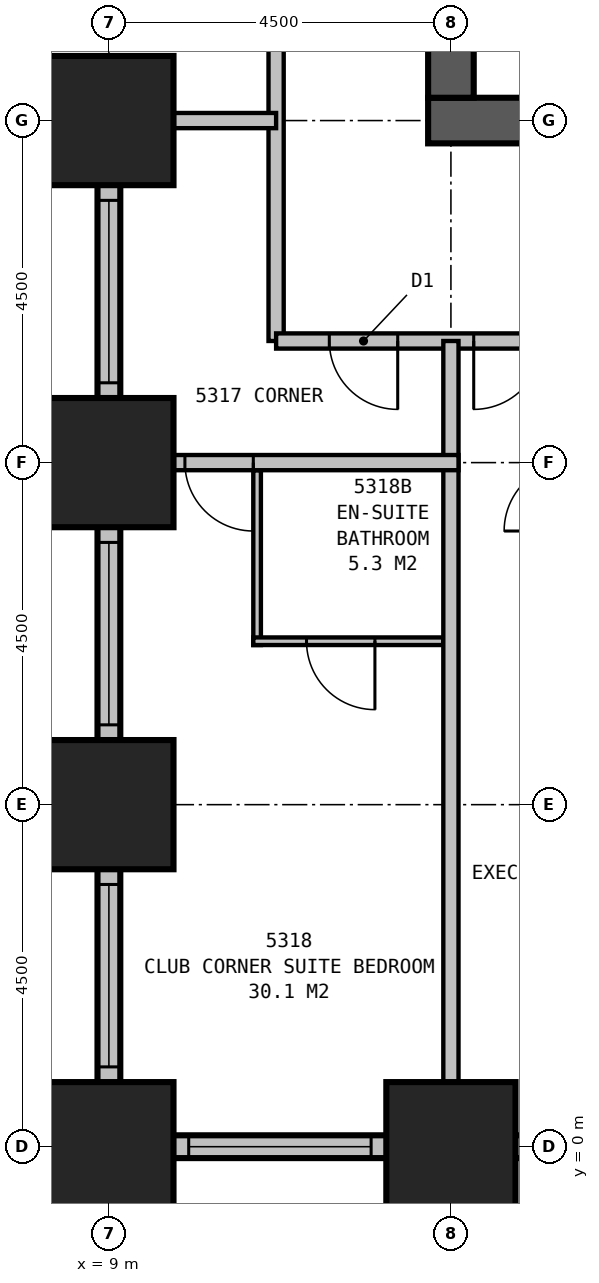
"""IFC4 building model, lengths in metres.
Left out: names, types, materials, properties, quantities, classifications, styles, units other than length and angle.
Written with IfcOpenShell. Run it as: python <this file> out.ifc"""

import sys

from ifc_helpers import new_model, si_unit, direction, frame, frame_2d, origin, origin_2d, place, context, subcontext, project, spatial, rectangle, extrude, element, fill, save


model = new_model("IFC4")
c1 = context("Model", 3, precision=1e-05, world=origin(), true_north=direction((0.0, 1.0)))
c2 = subcontext(c1, "Body", "Model", "MODEL_VIEW")
j1 = project(units=[si_unit("LENGTHUNIT", "METRE"), si_unit("PLANEANGLEUNIT", "RADIAN")], contexts=[c1])
p1 = place(None, origin())
s1 = spatial("IfcSite", under=j1, at=p1, CompositionType="ELEMENT")
p2 = place(p1, origin())
s2 = spatial("IfcBuilding", under=s1, at=p2, CompositionType="ELEMENT")
p3 = place(p2, frame((0.0, 0.0, 204.4)))
s3 = spatial("IfcBuildingStorey", under=s2, at=p3, CompositionType="ELEMENT", Elevation=204.4)
for number, where, z_axis, x_axis in (
    (1, (9.0, 13.5, 0.0), (0.0, 0.0, 1.0), (1.0, 0.0, 0.0)),
    (2, (9.0, 9.0, 0.0), (0.0, 0.0, 1.0), (1.0, 0.0, 0.0)),
    (3, (9.0, 4.5, 0.0), (0.0, 0.0, 1.0), (1.0, 0.0, 0.0)),
    (4, (9.0, 0.0, 0.0), (0.0, 0.0, 1.0), (1.0, 0.0, 0.0)),
    (5, (13.5, 0.0, 0.0), (0.0, 0.0, 1.0), (1.0, 0.0, 0.0)),
):
    element("IfcColumn", number, at=place(p3, frame(where, z_axis=z_axis, x_axis=x_axis)), inside=s3, PredefinedType="COLUMN", context=c2, shape_type="SweptSolid", body=[
        extrude(rectangle(XDim=1.7, YDim=1.7, at=origin_2d()), origin(), (0.0, 0.0, 1.0), 3.5),
    ])
p4 = place(p3, frame((13.2, 13.5, 0.0), z_axis=(0.0, 0.0, 1.0), x_axis=(1.0, 0.0, 0.0)))
e6 = element("IfcWall", 6, at=p4, inside=s3, PredefinedType="SHEAR", context=c2, shape_type="SweptSolid", body=[
    extrude(rectangle(XDim=23.1, YDim=0.6, at=frame_2d((11.55, 0.0))), origin(), (0.0, 0.0, 1.0), 3.5),
])
p5 = place(p3, frame((13.5, 16.5, 0.0), z_axis=(0.0, 0.0, 1.0), x_axis=(0.0, -1.0, 0.0)))
e7 = element("IfcWall", 7, at=p5, inside=s3, PredefinedType="SHEAR", context=c2, shape_type="SweptSolid", body=[
    extrude(rectangle(XDim=2.7, YDim=0.6, at=frame_2d((1.35, 0.0))), origin(), (0.0, 0.0, 1.0), 3.5),
])
p6 = place(p3, frame((1.35, 13.5, 0.0), z_axis=(0.0, 0.0, 1.0), x_axis=(1.0, 0.0, 0.0)))
e8 = element("IfcWall", 8, at=p6, inside=s3, PredefinedType="STANDARD", context=c2, shape_type="SweptSolid", body=[
    extrude(rectangle(XDim=7.8, YDim=0.3, at=frame_2d((3.9, 0.0))), origin(), (0.0, 0.0, 1.0), 2.25),
])
p7 = place(p6, frame((1.2, 0.0, 0.5)))
e9 = element("IfcOpeningElement", 9, at=p7, cuts=e8, PredefinedType="OPENING", context=c2, shape_type="SweptSolid", body=[
    extrude(rectangle(XDim=0.9, YDim=1.6, at=frame_2d((0.45, 0.8))), frame((0.0, 0.16, 0.0), z_axis=(0.0, -1.0, 0.0), x_axis=(1.0, 0.0, 0.0)), (0.0, 0.0, 1.0), 0.32),
])
p8 = place(p6, frame((4.2, 0.0, 0.5)))
e10 = element("IfcOpeningElement", 10, at=p8, cuts=e8, PredefinedType="OPENING", context=c2, shape_type="SweptSolid", body=[
    extrude(rectangle(XDim=2.4, YDim=1.6, at=frame_2d((1.2, 0.8))), frame((0.0, 0.16, 0.0), z_axis=(0.0, -1.0, 0.0), x_axis=(1.0, 0.0, 0.0)), (0.0, 0.0, 1.0), 0.32),
])
p9 = place(p3, frame((9.0, 13.65, 0.0), z_axis=(0.0, 0.0, 1.0), x_axis=(0.0, -1.0, 0.0)))
e11 = element("IfcWall", 11, at=p9, inside=s3, PredefinedType="STANDARD", context=c2, shape_type="SweptSolid", body=[
    extrude(rectangle(XDim=13.8, YDim=0.3, at=frame_2d((6.9, 0.0))), origin(), (0.0, 0.0, 1.0), 2.25),
])
p10 = place(p9, frame((1.2, 0.0, 0.5)))
e12 = element("IfcOpeningElement", 12, at=p10, cuts=e11, PredefinedType="OPENING", context=c2, shape_type="SweptSolid", body=[
    extrude(rectangle(XDim=2.4, YDim=1.6, at=frame_2d((1.2, 0.8))), frame((0.0, 0.16, 0.0), z_axis=(0.0, -1.0, 0.0), x_axis=(1.0, 0.0, 0.0)), (0.0, 0.0, 1.0), 0.32),
])
p11 = place(p9, frame((5.7, 0.0, 0.5)))
e13 = element("IfcOpeningElement", 13, at=p11, cuts=e11, PredefinedType="OPENING", context=c2, shape_type="SweptSolid", body=[
    extrude(rectangle(XDim=2.4, YDim=1.6, at=frame_2d((1.2, 0.8))), frame((0.0, 0.16, 0.0), z_axis=(0.0, -1.0, 0.0), x_axis=(1.0, 0.0, 0.0)), (0.0, 0.0, 1.0), 0.32),
])
p12 = place(p9, frame((10.2, 0.0, 0.5)))
e14 = element("IfcOpeningElement", 14, at=p12, cuts=e11, PredefinedType="OPENING", context=c2, shape_type="SweptSolid", body=[
    extrude(rectangle(XDim=2.4, YDim=1.6, at=frame_2d((1.2, 0.8))), frame((0.0, 0.16, 0.0), z_axis=(0.0, -1.0, 0.0), x_axis=(1.0, 0.0, 0.0)), (0.0, 0.0, 1.0), 0.32),
])
p13 = place(p3, frame((8.85, 0.0, 0.0), z_axis=(0.0, 0.0, 1.0), x_axis=(1.0, 0.0, 0.0)))
e15 = element("IfcWall", 15, at=p13, inside=s3, PredefinedType="STANDARD", context=c2, shape_type="SweptSolid", body=[
    extrude(rectangle(XDim=36.3, YDim=0.3, at=frame_2d((18.15, 0.0))), origin(), (0.0, 0.0, 1.0), 2.25),
])
p14 = place(p13, frame((1.2, 0.0, 0.5)))
e16 = element("IfcOpeningElement", 16, at=p14, cuts=e15, PredefinedType="OPENING", context=c2, shape_type="SweptSolid", body=[
    extrude(rectangle(XDim=2.4, YDim=1.6, at=frame_2d((1.2, 0.8))), frame((0.0, 0.16, 0.0), z_axis=(0.0, -1.0, 0.0), x_axis=(1.0, 0.0, 0.0)), (0.0, 0.0, 1.0), 0.32),
])
p15 = place(p13, frame((5.7, 0.0, 0.5)))
e17 = element("IfcOpeningElement", 17, at=p15, cuts=e15, PredefinedType="OPENING", context=c2, shape_type="SweptSolid", body=[
    extrude(rectangle(XDim=2.4, YDim=1.6, at=frame_2d((1.2, 0.8))), frame((0.0, 0.16, 0.0), z_axis=(0.0, -1.0, 0.0), x_axis=(1.0, 0.0, 0.0)), (0.0, 0.0, 1.0), 0.32),
])
p16 = place(p13, frame((10.2, 0.0, 0.5)))
e18 = element("IfcOpeningElement", 18, at=p16, cuts=e15, PredefinedType="OPENING", context=c2, shape_type="SweptSolid", body=[
    extrude(rectangle(XDim=2.4, YDim=1.6, at=frame_2d((1.2, 0.8))), frame((0.0, 0.16, 0.0), z_axis=(0.0, -1.0, 0.0), x_axis=(1.0, 0.0, 0.0)), (0.0, 0.0, 1.0), 0.32),
])
p17 = place(p13, frame((14.7, 0.0, 0.5)))
e19 = element("IfcOpeningElement", 19, at=p17, cuts=e15, PredefinedType="OPENING", context=c2, shape_type="SweptSolid", body=[
    extrude(rectangle(XDim=2.4, YDim=1.6, at=frame_2d((1.2, 0.8))), frame((0.0, 0.16, 0.0), z_axis=(0.0, -1.0, 0.0), x_axis=(1.0, 0.0, 0.0)), (0.0, 0.0, 1.0), 0.32),
])
p18 = place(p13, frame((19.2, 0.0, 0.5)))
e20 = element("IfcOpeningElement", 20, at=p18, cuts=e15, PredefinedType="OPENING", context=c2, shape_type="SweptSolid", body=[
    extrude(rectangle(XDim=2.4, YDim=1.6, at=frame_2d((1.2, 0.8))), frame((0.0, 0.16, 0.0), z_axis=(0.0, -1.0, 0.0), x_axis=(1.0, 0.0, 0.0)), (0.0, 0.0, 1.0), 0.32),
])
p19 = place(p13, frame((23.7, 0.0, 0.5)))
e21 = element("IfcOpeningElement", 21, at=p19, cuts=e15, PredefinedType="OPENING", context=c2, shape_type="SweptSolid", body=[
    extrude(rectangle(XDim=2.4, YDim=1.6, at=frame_2d((1.2, 0.8))), frame((0.0, 0.16, 0.0), z_axis=(0.0, -1.0, 0.0), x_axis=(1.0, 0.0, 0.0)), (0.0, 0.0, 1.0), 0.32),
])
p20 = place(p13, frame((28.2, 0.0, 0.5)))
e22 = element("IfcOpeningElement", 22, at=p20, cuts=e15, PredefinedType="OPENING", context=c2, shape_type="SweptSolid", body=[
    extrude(rectangle(XDim=2.4, YDim=1.6, at=frame_2d((1.2, 0.8))), frame((0.0, 0.16, 0.0), z_axis=(0.0, -1.0, 0.0), x_axis=(1.0, 0.0, 0.0)), (0.0, 0.0, 1.0), 0.32),
])
p21 = place(p13, frame((32.7, 0.0, 0.5)))
e23 = element("IfcOpeningElement", 23, at=p21, cuts=e15, PredefinedType="OPENING", context=c2, shape_type="SweptSolid", body=[
    extrude(rectangle(XDim=2.4, YDim=1.6, at=frame_2d((1.2, 0.8))), frame((0.0, 0.16, 0.0), z_axis=(0.0, -1.0, 0.0), x_axis=(1.0, 0.0, 0.0)), (0.0, 0.0, 1.0), 0.32),
])
p22 = place(p3, frame((11.2, 10.6, 0.0), z_axis=(0.0, 0.0, 1.0), x_axis=(1.0, 0.0, 0.0)))
e24 = element("IfcWall", 24, at=p22, inside=s3, PredefinedType="PARTITIONING", context=c2, shape_type="SweptSolid", body=[
    extrude(rectangle(XDim=27.1, YDim=0.2, at=frame_2d((13.55, 0.0))), origin(), (0.0, 0.0, 1.0), 3.25),
])
p23 = place(p22, frame((3.5, 0.0, 0.0), z_axis=(0.0, 0.0, 1.0), x_axis=(-1.0, 0.0, 0.0)))
e25 = element("IfcOpeningElement", 25, at=p23, cuts=e24, PredefinedType="OPENING", context=c2, shape_type="SweptSolid", body=[
    extrude(rectangle(XDim=0.9, YDim=2.1, at=frame_2d((0.45, 1.05))), frame((0.0, 0.11, 0.0), z_axis=(0.0, -1.0, 0.0), x_axis=(1.0, 0.0, 0.0)), (0.0, 0.0, 1.0), 0.22),
])
p24 = place(p22, frame((16.35, 0.0, 0.0), z_axis=(0.0, 0.0, 1.0), x_axis=(-1.0, 0.0, 0.0)))
e26 = element("IfcOpeningElement", 26, at=p24, cuts=e24, PredefinedType="OPENING", context=c2, shape_type="SweptSolid", body=[
    extrude(rectangle(XDim=1.0, YDim=2.1, at=frame_2d((0.5, 1.05))), frame((0.0, 0.11, 0.0), z_axis=(0.0, -1.0, 0.0), x_axis=(1.0, 0.0, 0.0)), (0.0, 0.0, 1.0), 0.22),
])
p25 = place(p22, frame((21.65, 0.0, 0.0), z_axis=(0.0, 0.0, 1.0), x_axis=(-1.0, 0.0, 0.0)))
e27 = element("IfcOpeningElement", 27, at=p25, cuts=e24, PredefinedType="OPENING", context=c2, shape_type="SweptSolid", body=[
    extrude(rectangle(XDim=0.9, YDim=2.1, at=frame_2d((0.45, 1.05))), frame((0.0, 0.11, 0.0), z_axis=(0.0, -1.0, 0.0), x_axis=(1.0, 0.0, 0.0)), (0.0, 0.0, 1.0), 0.22),
])
p26 = place(p22, frame((1.6, 0.0, 0.0), z_axis=(0.0, 0.0, 1.0), x_axis=(-1.0, 0.0, 0.0)))
e28 = element("IfcOpeningElement", 28, at=p26, cuts=e24, PredefinedType="OPENING", context=c2, shape_type="SweptSolid", body=[
    extrude(rectangle(XDim=0.9, YDim=2.1, at=frame_2d((0.45, 1.05))), frame((0.0, 0.11, 0.0), z_axis=(0.0, -1.0, 0.0), x_axis=(1.0, 0.0, 0.0)), (0.0, 0.0, 1.0), 0.22),
])
p27 = place(p22, frame((26.4, 0.0, 0.0), z_axis=(0.0, 0.0, 1.0), x_axis=(-1.0, 0.0, 0.0)))
e29 = element("IfcOpeningElement", 29, at=p27, cuts=e24, PredefinedType="OPENING", context=c2, shape_type="SweptSolid", body=[
    extrude(rectangle(XDim=0.9, YDim=2.1, at=frame_2d((0.45, 1.05))), frame((0.0, 0.11, 0.0), z_axis=(0.0, -1.0, 0.0), x_axis=(1.0, 0.0, 0.0)), (0.0, 0.0, 1.0), 0.22),
])
p28 = place(p3, frame((11.2, 10.6, 0.0), z_axis=(0.0, 0.0, 1.0), x_axis=(0.0, 1.0, 0.0)))
e30 = element("IfcWall", 30, at=p28, inside=s3, PredefinedType="PARTITIONING", context=c2, shape_type="SweptSolid", body=[
    extrude(rectangle(XDim=18.7, YDim=0.2, at=frame_2d((9.35, 0.0))), origin(), (0.0, 0.0, 1.0), 3.25),
])
p29 = place(p28, frame((4.9, 0.0, 0.0)))
e31 = element("IfcOpeningElement", 31, at=p29, cuts=e30, PredefinedType="OPENING", context=c2, shape_type="SweptSolid", body=[
    extrude(rectangle(XDim=1.0, YDim=2.1, at=frame_2d((0.5, 1.05))), frame((0.0, 0.11, 0.0), z_axis=(0.0, -1.0, 0.0), x_axis=(1.0, 0.0, 0.0)), (0.0, 0.0, 1.0), 0.22),
])
p30 = place(p28, frame((9.35, 0.0, 0.0)))
e32 = element("IfcOpeningElement", 32, at=p30, cuts=e30, PredefinedType="OPENING", context=c2, shape_type="SweptSolid", body=[
    extrude(rectangle(XDim=0.9, YDim=2.1, at=frame_2d((0.45, 1.05))), frame((0.0, 0.11, 0.0), z_axis=(0.0, -1.0, 0.0), x_axis=(1.0, 0.0, 0.0)), (0.0, 0.0, 1.0), 0.22),
])
p31 = place(p3, frame((11.2, 13.5, 0.0), z_axis=(0.0, 0.0, 1.0), x_axis=(-1.0, 0.0, 0.0)))
e33 = element("IfcWall", 33, at=p31, inside=s3, PredefinedType="PARTITIONING", context=c2, shape_type="SweptSolid", body=[
    extrude(rectangle(XDim=2.2, YDim=0.2, at=frame_2d((1.1, 0.0))), origin(), (0.0, 0.0, 1.0), 1.95),
])
p32 = place(p3, frame((13.5, 10.6, 0.0), z_axis=(0.0, 0.0, 1.0), x_axis=(0.0, -1.0, 0.0)))
e34 = element("IfcWall", 34, at=p32, inside=s3, PredefinedType="PARTITIONING", context=c2, shape_type="SweptSolid", body=[
    extrude(rectangle(XDim=10.6, YDim=0.2, at=frame_2d((5.3, 0.0))), origin(), (0.0, 0.0, 1.0), 2.25),
])
p33 = place(p3, frame((13.6, 9.0, 0.0), z_axis=(0.0, 0.0, 1.0), x_axis=(-1.0, 0.0, 0.0)))
e35 = element("IfcWall", 35, at=p33, inside=s3, PredefinedType="PARTITIONING", context=c2, shape_type="SweptSolid", body=[
    extrude(rectangle(XDim=4.6, YDim=0.2, at=frame_2d((2.3, 0.0))), origin(), (0.0, 0.0, 1.0), 3.25),
])
p34 = place(p33, frame((2.7, 0.0, 0.0)))
e36 = element("IfcOpeningElement", 36, at=p34, cuts=e35, PredefinedType="OPENING", context=c2, shape_type="SweptSolid", body=[
    extrude(rectangle(XDim=0.9, YDim=2.1, at=frame_2d((0.45, 1.05))), frame((0.0, 0.11, 0.0), z_axis=(0.0, -1.0, 0.0), x_axis=(1.0, 0.0, 0.0)), (0.0, 0.0, 1.0), 0.22),
])
p35 = place(p3, frame((10.95, 8.9, 0.0), z_axis=(0.0, 0.0, 1.0), x_axis=(0.0, -1.0, 0.0)))
e37 = element("IfcWall", 37, at=p35, inside=s3, PredefinedType="PLUMBINGWALL", context=c2, shape_type="SweptSolid", body=[
    extrude(rectangle(XDim=2.3, YDim=0.1, at=frame_2d((1.15, 0.0))), origin(), (0.0, 0.0, 1.0), 3.25),
])
p36 = place(p3, frame((13.4, 6.65, 0.0), z_axis=(0.0, 0.0, 1.0), x_axis=(-1.0, 0.0, 0.0)))
e38 = element("IfcWall", 38, at=p36, inside=s3, PredefinedType="PLUMBINGWALL", context=c2, shape_type="SweptSolid", body=[
    extrude(rectangle(XDim=2.5, YDim=0.1, at=frame_2d((1.25, 0.0))), origin(), (0.0, 0.0, 1.0), 3.25),
])
p37 = place(p36, frame((0.9, 0.0, 0.0)))
e39 = element("IfcOpeningElement", 39, at=p37, cuts=e38, PredefinedType="OPENING", context=c2, shape_type="SweptSolid", body=[
    extrude(rectangle(XDim=0.9, YDim=2.1, at=frame_2d((0.45, 1.05))), frame((0.0, 0.06, 0.0), z_axis=(0.0, -1.0, 0.0), x_axis=(1.0, 0.0, 0.0)), (0.0, 0.0, 1.0), 0.12),
])
p38 = place(p10, origin())
e40 = element("IfcWindow", 40, at=p38, inside=s3, PartitioningType="SINGLE_PANEL", PredefinedType="WINDOW", context=c2, shape_type="SweptSolid", body=[
    extrude(rectangle(XDim=2.4, YDim=1.6, at=frame_2d((1.2, 0.8))), frame((0.0, 0.03, 0.0), z_axis=(0.0, -1.0, 0.0), x_axis=(1.0, 0.0, 0.0)), (0.0, 0.0, 1.0), 0.06),
])
fill(e12, e40)
p39 = place(p11, origin())
e41 = element("IfcWindow", 41, at=p39, inside=s3, PartitioningType="SINGLE_PANEL", PredefinedType="WINDOW", context=c2, shape_type="SweptSolid", body=[
    extrude(rectangle(XDim=2.4, YDim=1.6, at=frame_2d((1.2, 0.8))), frame((0.0, 0.03, 0.0), z_axis=(0.0, -1.0, 0.0), x_axis=(1.0, 0.0, 0.0)), (0.0, 0.0, 1.0), 0.06),
])
fill(e13, e41)
p40 = place(p12, origin())
e42 = element("IfcWindow", 42, at=p40, inside=s3, PartitioningType="SINGLE_PANEL", PredefinedType="WINDOW", context=c2, shape_type="SweptSolid", body=[
    extrude(rectangle(XDim=2.4, YDim=1.6, at=frame_2d((1.2, 0.8))), frame((0.0, 0.03, 0.0), z_axis=(0.0, -1.0, 0.0), x_axis=(1.0, 0.0, 0.0)), (0.0, 0.0, 1.0), 0.06),
])
fill(e14, e42)
p41 = place(p14, origin())
e43 = element("IfcWindow", 43, at=p41, inside=s3, PartitioningType="SINGLE_PANEL", PredefinedType="WINDOW", context=c2, shape_type="SweptSolid", body=[
    extrude(rectangle(XDim=2.4, YDim=1.6, at=frame_2d((1.2, 0.8))), frame((0.0, 0.03, 0.0), z_axis=(0.0, -1.0, 0.0), x_axis=(1.0, 0.0, 0.0)), (0.0, 0.0, 1.0), 0.06),
])
fill(e16, e43)
p42 = place(p23, origin())
e44 = element("IfcDoor", 44, at=p42, inside=s3, OperationType="SINGLE_SWING_RIGHT", PredefinedType="DOOR", context=c2, shape_type="SweptSolid", body=[
    extrude(rectangle(XDim=0.9, YDim=2.1, at=frame_2d((0.45, 1.05))), frame((0.0, 0.025, 0.0), z_axis=(0.0, -1.0, 0.0), x_axis=(1.0, 0.0, 0.0)), (0.0, 0.0, 1.0), 0.05),
])
fill(e25, e44)
p43 = place(p26, origin())
e45 = element("IfcDoor", 45, at=p43, inside=s3, OperationType="SINGLE_SWING_LEFT", PredefinedType="DOOR", context=c2, shape_type="SweptSolid", body=[
    extrude(rectangle(XDim=0.9, YDim=2.1, at=frame_2d((0.45, 1.05))), frame((0.0, 0.025, 0.0), z_axis=(0.0, -1.0, 0.0), x_axis=(1.0, 0.0, 0.0)), (0.0, 0.0, 1.0), 0.05),
])
fill(e28, e45)
p44 = place(p34, origin())
e46 = element("IfcDoor", 46, at=p44, inside=s3, OperationType="SINGLE_SWING_LEFT", PredefinedType="DOOR", context=c2, shape_type="SweptSolid", body=[
    extrude(rectangle(XDim=0.9, YDim=2.1, at=frame_2d((0.45, 1.05))), frame((0.0, 0.025, 0.0), z_axis=(0.0, -1.0, 0.0), x_axis=(1.0, 0.0, 0.0)), (0.0, 0.0, 1.0), 0.05),
])
fill(e36, e46)
p45 = place(p37, origin())
e47 = element("IfcDoor", 47, at=p45, inside=s3, OperationType="SINGLE_SWING_LEFT", PredefinedType="DOOR", context=c2, shape_type="SweptSolid", body=[
    extrude(rectangle(XDim=0.9, YDim=2.1, at=frame_2d((0.45, 1.05))), frame((0.0, 0.025, 0.0), z_axis=(0.0, -1.0, 0.0), x_axis=(1.0, 0.0, 0.0)), (0.0, 0.0, 1.0), 0.05),
])
fill(e39, e47)
save(model, sys.argv[1])
